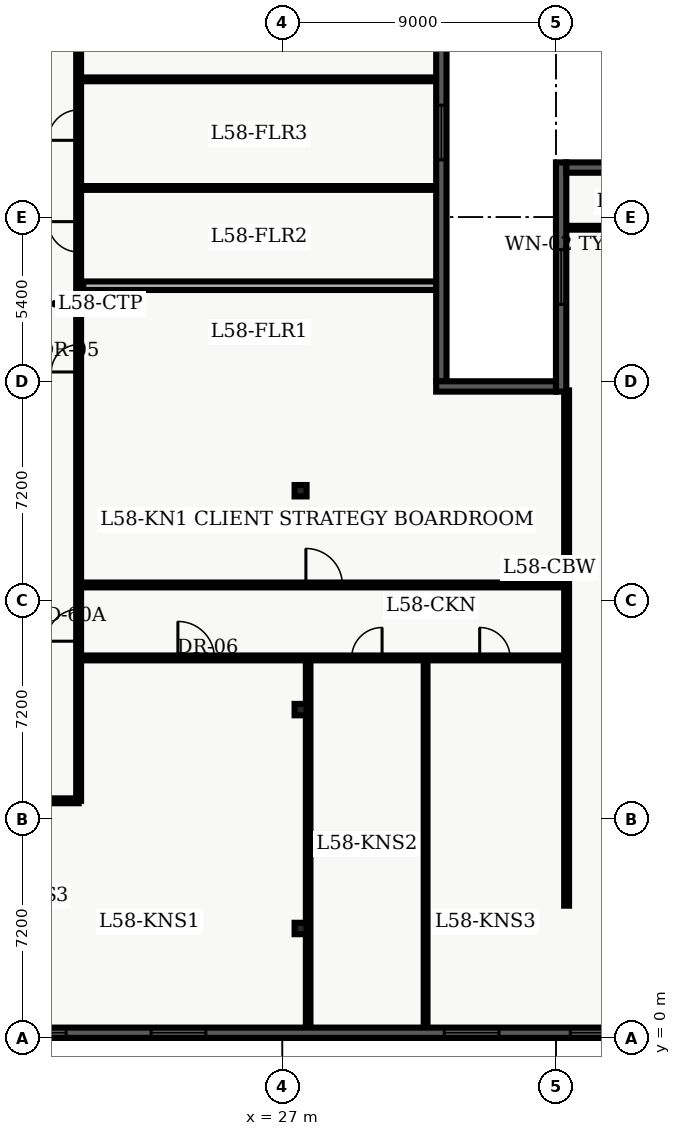
"""IFC4 building model, lengths in metres.
Left out: names, types, materials, properties, quantities, classifications, styles, units other than length and angle.
Written with IfcOpenShell. Run it as: python <this file> out.ifc"""

import sys

from ifc_helpers import new_model, entity, si_unit, converted_unit, direction, frame, origin_with_axes, origin_2d_with_axis, place, context, subcontext, project, spatial, polyline, rectangle, i_section, outline, extrude, element, fill, save


model = new_model("IFC4")
c1 = context("Model", 3, precision=1e-05, world=origin_with_axes(), true_north=direction((0.0, 1.0)))
c2 = subcontext(c1, "Body", "Model", "MODEL_VIEW")
j1 = project(units=[si_unit("LENGTHUNIT", "METRE"), converted_unit("PLANEANGLEUNIT", "DEGREE", entity("IfcPlaneAngleMeasure", 0.017), si_unit("PLANEANGLEUNIT", "RADIAN"), dimensions=[0, 0, 0, 0, 0, 0, 0])], contexts=[c1])
p1 = place(None, origin_with_axes())
s1 = spatial("IfcSite", under=j1, at=p1, CompositionType="ELEMENT")
p2 = place(p1, origin_with_axes())
s2 = spatial("IfcBuilding", under=s1, at=p2, CompositionType="ELEMENT")
p3 = place(p2, frame((0.0, 0.0, 236.4), z_axis=(0.0, 0.0, 1.0), x_axis=(1.0, 0.0, 0.0)))
s3 = spatial("IfcBuildingStorey", under=s2, at=p3, CompositionType="ELEMENT", Elevation=236.4)
for number, where, z_axis, x_axis in (
    (1, (27.6, 3.6, 0.0), (0.0, 0.0, 1.0), (1.0, 0.0, 0.0)),
    (2, (27.6, 10.8, 0.0), (0.0, 0.0, 1.0), (1.0, 0.0, 0.0)),
    (3, (27.6, 18.0, 0.0), (0.0, 0.0, 1.0), (1.0, 0.0, 0.0)),
):
    element("IfcColumn", number, at=place(p3, frame(where, z_axis=z_axis, x_axis=x_axis)), inside=s3, PredefinedType="COLUMN", context=c2, shape_type="SweptSolid", body=[
        extrude(i_section(OverallWidth=0.394, OverallDepth=0.375, WebThickness=0.017, FlangeThickness=0.028, FilletRadius=0.02, at=origin_2d_with_axis()), origin_with_axes(), (0.0, 0.0, 1.0), 3.9),
    ])
p4 = place(p3, frame((7.1, 7.8, 0.0), z_axis=(0.0, 0.0, 1.0), x_axis=(1.0, 0.0, 0.0)))
e4 = element("IfcWall", 4, at=p4, inside=s3, PredefinedType="PARTITIONING", context=c2, shape_type="SweptSolid", body=[
    extrude(outline(polyline([(0.0, -0.08), (13.2, -0.08), (13.2, 0.08), (0.0, 0.08), (0.0, -0.08)])), origin_with_axes(), (0.0, 0.0, 1.0), 2.7),
])
p5 = place(p4, frame((2.929, 0.0, 0.0), z_axis=(0.0, 0.0, 1.0), x_axis=(1.0, 0.0, 0.0)))
e5 = element("IfcOpeningElement", 5, at=p5, cuts=e4, PredefinedType="OPENING", context=c2, shape_type="SweptSolid", body=[
    extrude(rectangle(XDim=1.0, YDim=0.18, at=origin_2d_with_axis()), origin_with_axes(), (0.0, 0.0, 1.0), 2.15),
])
p6 = place(p4, frame((7.56, 0.0, 0.0), z_axis=(0.0, 0.0, 1.0), x_axis=(1.0, 0.0, 0.0)))
e6 = element("IfcOpeningElement", 6, at=p6, cuts=e4, PredefinedType="OPENING", context=c2, shape_type="SweptSolid", body=[
    extrude(rectangle(XDim=1.0, YDim=0.18, at=origin_2d_with_axis()), origin_with_axes(), (0.0, 0.0, 1.0), 2.15),
])
p7 = place(p4, frame((11.201, 0.0, 0.0), z_axis=(0.0, 0.0, 1.0), x_axis=(1.0, 0.0, 0.0)))
e7 = element("IfcOpeningElement", 7, at=p7, cuts=e4, PredefinedType="OPENING", context=c2, shape_type="SweptSolid", body=[
    extrude(rectangle(XDim=1.0, YDim=0.18, at=origin_2d_with_axis()), origin_with_axes(), (0.0, 0.0, 1.0), 2.15),
])
p8 = place(p3, frame((20.3, 7.8, 0.0), z_axis=(0.0, 0.0, 1.0), x_axis=(0.0, 1.0, 0.0)))
e8 = element("IfcWall", 8, at=p8, inside=s3, PredefinedType="PARTITIONING", context=c2, shape_type="SweptSolid", body=[
    extrude(outline(polyline([(0.0, -0.08), (32.7, -0.08), (32.7, 0.08), (0.0, 0.08), (0.0, -0.08)])), origin_with_axes(), (0.0, 0.0, 1.0), 2.7),
])
p9 = place(p8, frame((14.556, 0.0, 0.0), z_axis=(0.0, 0.0, 1.0), x_axis=(1.0, 0.0, 0.0)))
e9 = element("IfcOpeningElement", 9, at=p9, cuts=e8, PredefinedType="OPENING", context=c2, shape_type="SweptSolid", body=[
    extrude(rectangle(XDim=0.9, YDim=0.18, at=origin_2d_with_axis()), origin_with_axes(), (0.0, 0.0, 1.0), 2.15),
])
p10 = place(p8, frame((18.551, 0.0, 0.0), z_axis=(0.0, 0.0, 1.0), x_axis=(1.0, 0.0, 0.0)))
e10 = element("IfcOpeningElement", 10, at=p10, cuts=e8, PredefinedType="OPENING", context=c2, shape_type="SweptSolid", body=[
    extrude(rectangle(XDim=1.0, YDim=0.18, at=origin_2d_with_axis()), origin_with_axes(), (0.0, 0.0, 1.0), 2.15),
])
p11 = place(p8, frame((22.226, 0.0, 0.0), z_axis=(0.0, 0.0, 1.0), x_axis=(1.0, 0.0, 0.0)))
e11 = element("IfcOpeningElement", 11, at=p11, cuts=e8, PredefinedType="OPENING", context=c2, shape_type="SweptSolid", body=[
    extrude(rectangle(XDim=1.0, YDim=0.18, at=origin_2d_with_axis()), origin_with_axes(), (0.0, 0.0, 1.0), 2.15),
])
p12 = place(p8, frame((25.754, 0.0, 0.0), z_axis=(0.0, 0.0, 1.0), x_axis=(1.0, 0.0, 0.0)))
e12 = element("IfcOpeningElement", 12, at=p12, cuts=e8, PredefinedType="OPENING", context=c2, shape_type="SweptSolid", body=[
    extrude(rectangle(XDim=1.0, YDim=0.18, at=origin_2d_with_axis()), origin_with_axes(), (0.0, 0.0, 1.0), 2.15),
])
p13 = place(p8, frame((5.775, 0.0, 0.0), z_axis=(0.0, 0.0, 1.0), x_axis=(1.0, 0.0, 0.0)))
e13 = element("IfcOpeningElement", 13, at=p13, cuts=e8, PredefinedType="OPENING", context=c2, shape_type="SweptSolid", body=[
    extrude(rectangle(XDim=1.05, YDim=0.18, at=origin_2d_with_axis()), origin_with_axes(), (0.0, 0.0, 1.0), 2.15),
])
p14 = place(p3, frame((20.45, 24.743, 0.0), z_axis=(0.0, 0.0, 1.0), x_axis=(1.0, 0.0, 0.0)))
e14 = element("IfcWall", 14, at=p14, inside=s3, PredefinedType="PARTITIONING", context=c2, shape_type="SweptSolid", body=[
    extrude(outline(polyline([(0.0, -0.14), (11.615, -0.14), (11.615, 0.14), (0.0, 0.14), (0.0, -0.14)])), origin_with_axes(), (0.0, 0.0, 1.0), 2.7),
])
for number, where, z_axis, x_axis in (
    (15, (20.45, 27.959, 0.0), (0.0, 0.0, 1.0), (1.0, 0.0, 0.0)),
    (16, (20.45, 31.532, 0.0), (0.0, 0.0, 1.0), (1.0, 0.0, 0.0)),
):
    element("IfcWall", number, at=place(p3, frame(where, z_axis=z_axis, x_axis=x_axis)), inside=s3, PredefinedType="PARTITIONING", context=c2, shape_type="SweptSolid", body=[
        extrude(outline(polyline([(0.0, -0.062), (11.615, -0.062), (11.615, 0.062), (0.0, 0.062), (0.0, -0.062)])), origin_with_axes(), (0.0, 0.0, 1.0), 2.7),
    ])
p15 = place(p3, frame((20.3, 12.5, 0.0), z_axis=(0.0, 0.0, 1.0), x_axis=(1.0, 0.0, 0.0)))
e17 = element("IfcWall", 17, at=p15, inside=s3, PredefinedType="PARTITIONING", context=c2, shape_type="SweptSolid", body=[
    extrude(outline(polyline([(0.0, -0.08), (16.05, -0.08), (16.05, 0.08), (0.0, 0.08), (0.0, -0.08)])), origin_with_axes(), (0.0, 0.0, 1.0), 2.7),
])
p16 = place(p15, frame((3.865, 0.0, 0.0), z_axis=(0.0, 0.0, 1.0), x_axis=(1.0, 0.0, 0.0)))
e18 = element("IfcOpeningElement", 18, at=p16, cuts=e17, PredefinedType="OPENING", context=c2, shape_type="SweptSolid", body=[
    extrude(rectangle(XDim=1.2, YDim=0.18, at=origin_2d_with_axis()), origin_with_axes(), (0.0, 0.0, 1.0), 2.2),
])
p17 = place(p15, frame((9.48, 0.0, 0.0), z_axis=(0.0, 0.0, 1.0), x_axis=(1.0, 0.0, 0.0)))
e19 = element("IfcOpeningElement", 19, at=p17, cuts=e17, PredefinedType="OPENING", context=c2, shape_type="SweptSolid", body=[
    extrude(rectangle(XDim=1.0, YDim=0.18, at=origin_2d_with_axis()), origin_with_axes(), (0.0, 0.0, 1.0), 2.15),
])
p18 = place(p15, frame((13.691, 0.0, 0.0), z_axis=(0.0, 0.0, 1.0), x_axis=(1.0, 0.0, 0.0)))
e20 = element("IfcOpeningElement", 20, at=p18, cuts=e17, PredefinedType="OPENING", context=c2, shape_type="SweptSolid", body=[
    extrude(rectangle(XDim=1.0, YDim=0.18, at=origin_2d_with_axis()), origin_with_axes(), (0.0, 0.0, 1.0), 2.15),
])
p19 = place(p3, frame((20.3, 14.9, 0.0), z_axis=(0.0, 0.0, 1.0), x_axis=(1.0, 0.0, 0.0)))
e21 = element("IfcWall", 21, at=p19, inside=s3, PredefinedType="PARTITIONING", context=c2, shape_type="SweptSolid", body=[
    extrude(outline(polyline([(0.0, -0.08), (16.05, -0.08), (16.05, 0.08), (0.0, 0.08), (0.0, -0.08)])), origin_with_axes(), (0.0, 0.0, 1.0), 2.7),
])
p20 = place(p19, frame((8.075, 0.0, 0.0), z_axis=(0.0, 0.0, 1.0), x_axis=(1.0, 0.0, 0.0)))
e22 = element("IfcOpeningElement", 22, at=p20, cuts=e21, PredefinedType="OPENING", context=c2, shape_type="SweptSolid", body=[
    extrude(rectangle(XDim=1.2, YDim=0.18, at=origin_2d_with_axis()), origin_with_axes(), (0.0, 0.0, 1.0), 2.2),
])
p21 = place(p3, frame((36.35, 4.35, 0.0), z_axis=(0.0, 0.0, 1.0), x_axis=(0.0, 1.0, 0.0)))
e23 = element("IfcWall", 23, at=p21, inside=s3, PredefinedType="PARTITIONING", context=c2, shape_type="SweptSolid", body=[
    extrude(outline(polyline([(0.0, -0.08), (16.95, -0.08), (16.95, 0.08), (0.0, 0.08), (0.0, -0.08)])), origin_with_axes(), (0.0, 0.0, 1.0), 2.7),
])
p22 = place(p3, frame((27.849, 0.335, 0.0), z_axis=(0.0, 0.0, 1.0), x_axis=(0.0, 1.0, 0.0)))
e24 = element("IfcWall", 24, at=p22, inside=s3, PredefinedType="PARTITIONING", context=c2, shape_type="SweptSolid", body=[
    extrude(outline(polyline([(0.0, -0.075), (12.045, -0.075), (12.045, 0.075), (0.0, 0.075), (0.0, -0.075)])), origin_with_axes(), (0.0, 0.0, 1.0), 2.7),
])
p23 = place(p3, frame((31.712, 0.335, 0.0), z_axis=(0.0, 0.0, 1.0), x_axis=(0.0, 1.0, 0.0)))
e25 = element("IfcWall", 25, at=p23, inside=s3, PredefinedType="PARTITIONING", context=c2, shape_type="SweptSolid", body=[
    extrude(outline(polyline([(0.0, -0.062), (12.045, -0.062), (12.045, 0.062), (0.0, 0.062), (0.0, -0.062)])), origin_with_axes(), (0.0, 0.0, 1.0), 2.7),
])
p24 = place(p3, frame((36.335, 26.65, 0.0), z_axis=(0.0, 0.0, 1.0), x_axis=(1.0, 0.0, 0.0)))
e26 = element("IfcWall", 26, at=p24, inside=s3, PredefinedType="PARTITIONING", context=c2, shape_type="SweptSolid", body=[
    extrude(outline(polyline([(0.0, -0.062), (11.195, -0.062), (11.195, 0.062), (0.0, 0.062), (0.0, -0.062)])), origin_with_axes(), (0.0, 0.0, 1.0), 2.7),
])
p25 = place(p24, frame((6.665, 0.0, 0.0), z_axis=(0.0, 0.0, 1.0), x_axis=(1.0, 0.0, 0.0)))
e27 = element("IfcOpeningElement", 27, at=p25, cuts=e26, PredefinedType="OPENING", context=c2, shape_type="SweptSolid", body=[
    extrude(rectangle(XDim=1.0, YDim=0.145, at=origin_2d_with_axis()), origin_with_axes(), (0.0, 0.0, 1.0), 2.15),
])
p26 = place(p3, frame((36.17, 21.26, 0.0), z_axis=(0.0, 0.0, 1.0), x_axis=(0.0, 1.0, 0.0)))
e28 = element("IfcWall", 28, at=p26, inside=s3, PredefinedType="SOLIDWALL", context=c2, shape_type="SweptSolid", body=[
    extrude(outline(polyline([(0.0, -0.17), (7.54, -0.17), (7.54, 0.17), (0.0, 0.17), (0.0, -0.17)])), origin_with_axes(), (0.0, 0.0, 1.0), 3.66),
])
p27 = place(p26, frame((3.77, 0.0, 0.45), z_axis=(0.0, 0.0, 1.0), x_axis=(1.0, 0.0, 0.0)))
e29 = element("IfcOpeningElement", 29, at=p27, cuts=e28, PredefinedType="OPENING", context=c2, shape_type="SweptSolid", body=[
    extrude(rectangle(XDim=1.8, YDim=0.36, at=origin_2d_with_axis()), origin_with_axes(), (0.0, 0.0, 1.0), 2.1),
])
p28 = place(p3, frame((36.34, 28.63, 0.0), z_axis=(0.0, 0.0, 1.0), x_axis=(1.0, 0.0, 0.0)))
e30 = element("IfcWall", 30, at=p28, inside=s3, PredefinedType="SOLIDWALL", context=c2, shape_type="SweptSolid", body=[
    extrude(outline(polyline([(0.0, -0.17), (13.46, -0.17), (13.46, 0.17), (0.0, 0.17), (0.0, -0.17)])), origin_with_axes(), (0.0, 0.0, 1.0), 3.66),
])
p29 = place(p28, frame((3.665, 0.0, 0.45), z_axis=(0.0, 0.0, 1.0), x_axis=(1.0, 0.0, 0.0)))
e31 = element("IfcOpeningElement", 31, at=p29, cuts=e30, PredefinedType="OPENING", context=c2, shape_type="SweptSolid", body=[
    extrude(rectangle(XDim=1.8, YDim=0.36, at=origin_2d_with_axis()), origin_with_axes(), (0.0, 0.0, 1.0), 2.1),
])
p30 = place(p28, frame((9.795, 0.0, 0.45), z_axis=(0.0, 0.0, 1.0), x_axis=(1.0, 0.0, 0.0)))
e32 = element("IfcOpeningElement", 32, at=p30, cuts=e30, PredefinedType="OPENING", context=c2, shape_type="SweptSolid", body=[
    extrude(rectangle(XDim=1.8, YDim=0.36, at=origin_2d_with_axis()), origin_with_axes(), (0.0, 0.0, 1.0), 2.1),
])
p31 = place(p3, frame((49.46, 0.17, 0.0), z_axis=(0.0, 0.0, 1.0), x_axis=(-1.0, 0.0, 0.0)))
e33 = element("IfcWall", 33, at=p31, inside=s3, PredefinedType="SOLIDWALL", context=c2, shape_type="SweptSolid", body=[
    extrude(outline(polyline([(0.0, -0.17), (42.56, -0.17), (42.56, 0.17), (0.0, 0.17), (0.0, -0.17)])), origin_with_axes(), (0.0, 0.0, 1.0), 3.66),
])
p32 = place(p31, frame((2.898, 0.0, 0.45), z_axis=(0.0, 0.0, 1.0), x_axis=(1.0, 0.0, 0.0)))
e34 = element("IfcOpeningElement", 34, at=p32, cuts=e33, PredefinedType="OPENING", context=c2, shape_type="SweptSolid", body=[
    extrude(rectangle(XDim=1.8, YDim=0.36, at=origin_2d_with_axis()), origin_with_axes(), (0.0, 0.0, 1.0), 2.1),
])
p33 = place(p31, frame((7.493, 0.0, 0.45), z_axis=(0.0, 0.0, 1.0), x_axis=(1.0, 0.0, 0.0)))
e35 = element("IfcOpeningElement", 35, at=p33, cuts=e33, PredefinedType="OPENING", context=c2, shape_type="SweptSolid", body=[
    extrude(rectangle(XDim=1.8, YDim=0.36, at=origin_2d_with_axis()), origin_with_axes(), (0.0, 0.0, 1.0), 2.1),
])
p34 = place(p31, frame((12.089, 0.0, 0.45), z_axis=(0.0, 0.0, 1.0), x_axis=(1.0, 0.0, 0.0)))
e36 = element("IfcOpeningElement", 36, at=p34, cuts=e33, PredefinedType="OPENING", context=c2, shape_type="SweptSolid", body=[
    extrude(rectangle(XDim=1.8, YDim=0.36, at=origin_2d_with_axis()), origin_with_axes(), (0.0, 0.0, 1.0), 2.1),
])
p35 = place(p31, frame((16.234, 0.0, 0.45), z_axis=(0.0, 0.0, 1.0), x_axis=(1.0, 0.0, 0.0)))
e37 = element("IfcOpeningElement", 37, at=p35, cuts=e33, PredefinedType="OPENING", context=c2, shape_type="SweptSolid", body=[
    extrude(rectangle(XDim=1.8, YDim=0.36, at=origin_2d_with_axis()), origin_with_axes(), (0.0, 0.0, 1.0), 2.1),
])
p36 = place(p31, frame((25.876, 0.0, 0.45), z_axis=(0.0, 0.0, 1.0), x_axis=(1.0, 0.0, 0.0)))
e38 = element("IfcOpeningElement", 38, at=p36, cuts=e33, PredefinedType="OPENING", context=c2, shape_type="SweptSolid", body=[
    extrude(rectangle(XDim=1.8, YDim=0.36, at=origin_2d_with_axis()), origin_with_axes(), (0.0, 0.0, 1.0), 2.1),
])
p37 = place(p31, frame((30.471, 0.0, 0.45), z_axis=(0.0, 0.0, 1.0), x_axis=(1.0, 0.0, 0.0)))
e39 = element("IfcOpeningElement", 39, at=p37, cuts=e33, PredefinedType="OPENING", context=c2, shape_type="SweptSolid", body=[
    extrude(rectangle(XDim=1.8, YDim=0.36, at=origin_2d_with_axis()), origin_with_axes(), (0.0, 0.0, 1.0), 2.1),
])
p38 = place(p31, frame((35.067, 0.0, 0.45), z_axis=(0.0, 0.0, 1.0), x_axis=(1.0, 0.0, 0.0)))
e40 = element("IfcOpeningElement", 40, at=p38, cuts=e33, PredefinedType="OPENING", context=c2, shape_type="SweptSolid", body=[
    extrude(rectangle(XDim=1.8, YDim=0.36, at=origin_2d_with_axis()), origin_with_axes(), (0.0, 0.0, 1.0), 2.1),
])
p39 = place(p31, frame((39.662, 0.0, 0.45), z_axis=(0.0, 0.0, 1.0), x_axis=(1.0, 0.0, 0.0)))
e41 = element("IfcOpeningElement", 41, at=p39, cuts=e33, PredefinedType="OPENING", context=c2, shape_type="SweptSolid", body=[
    extrude(rectangle(XDim=1.8, YDim=0.36, at=origin_2d_with_axis()), origin_with_axes(), (0.0, 0.0, 1.0), 2.1),
])
p40 = place(p3, frame((32.23, 41.82, 0.0), z_axis=(0.0, 0.0, 1.0), x_axis=(0.0, -1.0, 0.0)))
e42 = element("IfcWall", 42, at=p40, inside=s3, PredefinedType="SOLIDWALL", context=c2, shape_type="SweptSolid", body=[
    extrude(outline(polyline([(0.0, -0.17), (20.22, -0.17), (20.22, 0.17), (0.0, 0.17), (0.0, -0.17)])), origin_with_axes(), (0.0, 0.0, 1.0), 3.66),
])
p41 = place(p40, frame((2.978, 0.0, 0.45), z_axis=(0.0, 0.0, 1.0), x_axis=(1.0, 0.0, 0.0)))
e43 = element("IfcOpeningElement", 43, at=p41, cuts=e42, PredefinedType="OPENING", context=c2, shape_type="SweptSolid", body=[
    extrude(rectangle(XDim=1.8, YDim=0.36, at=origin_2d_with_axis()), origin_with_axes(), (0.0, 0.0, 1.0), 2.1),
])
p42 = place(p40, frame((7.732, 0.0, 0.45), z_axis=(0.0, 0.0, 1.0), x_axis=(1.0, 0.0, 0.0)))
e44 = element("IfcOpeningElement", 44, at=p42, cuts=e42, PredefinedType="OPENING", context=c2, shape_type="SweptSolid", body=[
    extrude(rectangle(XDim=1.8, YDim=0.36, at=origin_2d_with_axis()), origin_with_axes(), (0.0, 0.0, 1.0), 2.1),
])
p43 = place(p40, frame((12.037, 0.0, 0.45), z_axis=(0.0, 0.0, 1.0), x_axis=(1.0, 0.0, 0.0)))
e45 = element("IfcOpeningElement", 45, at=p43, cuts=e42, PredefinedType="OPENING", context=c2, shape_type="SweptSolid", body=[
    extrude(rectangle(XDim=1.8, YDim=0.36, at=origin_2d_with_axis()), origin_with_axes(), (0.0, 0.0, 1.0), 2.1),
])
p44 = place(p3, frame((32.06, 21.43, 0.0), z_axis=(0.0, 0.0, 1.0), x_axis=(1.0, 0.0, 0.0)))
e46 = element("IfcWall", 46, at=p44, inside=s3, PredefinedType="SOLIDWALL", context=c2, shape_type="SweptSolid", body=[
    extrude(outline(polyline([(0.0, -0.17), (3.94, -0.17), (3.94, 0.17), (0.0, 0.17), (0.0, -0.17)])), origin_with_axes(), (0.0, 0.0, 1.0), 3.66),
])
p45 = place(p8, frame((14.556, 0.0, 0.0), z_axis=(0.0, 0.0, 1.0), x_axis=(1.0, 0.0, 0.0)))
e47 = element("IfcDoor", 47, at=p45, inside=s3, OperationType="SINGLE_SWING_LEFT", PredefinedType="DOOR", context=c2, shape_type="SweptSolid", body=[
    extrude(rectangle(XDim=0.9, YDim=0.09, at=origin_2d_with_axis()), origin_with_axes(), (0.0, 0.0, 1.0), 2.15),
])
fill(e9, e47)
p46 = place(p8, frame((18.551, 0.0, 0.0), z_axis=(0.0, 0.0, 1.0), x_axis=(1.0, 0.0, 0.0)))
e48 = element("IfcDoor", 48, at=p46, inside=s3, OperationType="SINGLE_SWING_RIGHT", PredefinedType="DOOR", context=c2, shape_type="SweptSolid", body=[
    extrude(rectangle(XDim=1.0, YDim=0.09, at=origin_2d_with_axis()), origin_with_axes(), (0.0, 0.0, 1.0), 2.15),
])
fill(e10, e48)
p47 = place(p8, frame((22.226, 0.0, 0.0), z_axis=(0.0, 0.0, 1.0), x_axis=(1.0, 0.0, 0.0)))
e49 = element("IfcDoor", 49, at=p47, inside=s3, OperationType="SINGLE_SWING_LEFT", PredefinedType="DOOR", context=c2, shape_type="SweptSolid", body=[
    extrude(rectangle(XDim=1.0, YDim=0.09, at=origin_2d_with_axis()), origin_with_axes(), (0.0, 0.0, 1.0), 2.15),
])
fill(e11, e49)
p48 = place(p8, frame((5.775, 0.0, 0.0), z_axis=(0.0, 0.0, 1.0), x_axis=(1.0, 0.0, 0.0)))
e50 = element("IfcDoor", 50, at=p48, inside=s3, OperationType="SINGLE_SWING_LEFT", PredefinedType="DOOR", context=c2, shape_type="SweptSolid", body=[
    extrude(rectangle(XDim=1.05, YDim=0.09, at=origin_2d_with_axis()), origin_with_axes(), (0.0, 0.0, 1.0), 2.15),
])
fill(e13, e50)
p49 = place(p15, frame((3.865, 0.0, 0.0), z_axis=(0.0, 0.0, 1.0), x_axis=(1.0, 0.0, 0.0)))
e51 = element("IfcDoor", 51, at=p49, inside=s3, OperationType="SINGLE_SWING_LEFT", PredefinedType="DOOR", context=c2, shape_type="SweptSolid", body=[
    extrude(rectangle(XDim=1.2, YDim=0.09, at=origin_2d_with_axis()), origin_with_axes(), (0.0, 0.0, 1.0), 2.2),
])
fill(e18, e51)
p50 = place(p15, frame((9.48, 0.0, 0.0), z_axis=(0.0, 0.0, 1.0), x_axis=(1.0, 0.0, 0.0)))
e52 = element("IfcDoor", 52, at=p50, inside=s3, OperationType="SINGLE_SWING_RIGHT", PredefinedType="DOOR", context=c2, shape_type="SweptSolid", body=[
    extrude(rectangle(XDim=1.0, YDim=0.09, at=origin_2d_with_axis()), origin_with_axes(), (0.0, 0.0, 1.0), 2.15),
])
fill(e19, e52)
p51 = place(p15, frame((13.691, 0.0, 0.0), z_axis=(0.0, 0.0, 1.0), x_axis=(1.0, 0.0, 0.0)))
e53 = element("IfcDoor", 53, at=p51, inside=s3, OperationType="SINGLE_SWING_LEFT", PredefinedType="DOOR", context=c2, shape_type="SweptSolid", body=[
    extrude(rectangle(XDim=1.0, YDim=0.09, at=origin_2d_with_axis()), origin_with_axes(), (0.0, 0.0, 1.0), 2.15),
])
fill(e20, e53)
p52 = place(p19, frame((8.075, 0.0, 0.0), z_axis=(0.0, 0.0, 1.0), x_axis=(1.0, 0.0, 0.0)))
e54 = element("IfcDoor", 54, at=p52, inside=s3, OperationType="SINGLE_SWING_LEFT", PredefinedType="DOOR", context=c2, shape_type="SweptSolid", body=[
    extrude(rectangle(XDim=1.2, YDim=0.09, at=origin_2d_with_axis()), origin_with_axes(), (0.0, 0.0, 1.0), 2.2),
])
fill(e22, e54)
p53 = place(p26, frame((3.77, 0.0, 0.45), z_axis=(0.0, 0.0, 1.0), x_axis=(1.0, 0.0, 0.0)))
e55 = element("IfcWindow", 55, at=p53, inside=s3, PredefinedType="WINDOW", context=c2, shape_type="SweptSolid", body=[
    extrude(rectangle(XDim=1.8, YDim=0.09, at=origin_2d_with_axis()), origin_with_axes(), (0.0, 0.0, 1.0), 2.1),
])
fill(e29, e55)
p54 = place(p31, frame((12.089, 0.0, 0.45), z_axis=(0.0, 0.0, 1.0), x_axis=(1.0, 0.0, 0.0)))
e56 = element("IfcWindow", 56, at=p54, inside=s3, PredefinedType="WINDOW", context=c2, shape_type="SweptSolid", body=[
    extrude(rectangle(XDim=1.8, YDim=0.09, at=origin_2d_with_axis()), origin_with_axes(), (0.0, 0.0, 1.0), 2.1),
])
fill(e36, e56)
p55 = place(p31, frame((16.234, 0.0, 0.45), z_axis=(0.0, 0.0, 1.0), x_axis=(1.0, 0.0, 0.0)))
e57 = element("IfcWindow", 57, at=p55, inside=s3, PredefinedType="WINDOW", context=c2, shape_type="SweptSolid", body=[
    extrude(rectangle(XDim=1.8, YDim=0.09, at=origin_2d_with_axis()), origin_with_axes(), (0.0, 0.0, 1.0), 2.1),
])
fill(e37, e57)
p56 = place(p31, frame((25.876, 0.0, 0.45), z_axis=(0.0, 0.0, 1.0), x_axis=(1.0, 0.0, 0.0)))
e58 = element("IfcWindow", 58, at=p56, inside=s3, PredefinedType="WINDOW", context=c2, shape_type="SweptSolid", body=[
    extrude(rectangle(XDim=1.8, YDim=0.09, at=origin_2d_with_axis()), origin_with_axes(), (0.0, 0.0, 1.0), 2.1),
])
fill(e38, e58)
p57 = place(p31, frame((30.471, 0.0, 0.45), z_axis=(0.0, 0.0, 1.0), x_axis=(1.0, 0.0, 0.0)))
e59 = element("IfcWindow", 59, at=p57, inside=s3, PredefinedType="WINDOW", context=c2, shape_type="SweptSolid", body=[
    extrude(rectangle(XDim=1.8, YDim=0.09, at=origin_2d_with_axis()), origin_with_axes(), (0.0, 0.0, 1.0), 2.1),
])
fill(e39, e59)
p58 = place(p40, frame((12.037, 0.0, 0.45), z_axis=(0.0, 0.0, 1.0), x_axis=(1.0, 0.0, 0.0)))
e60 = element("IfcWindow", 60, at=p58, inside=s3, PredefinedType="WINDOW", context=c2, shape_type="SweptSolid", body=[
    extrude(rectangle(XDim=1.8, YDim=0.09, at=origin_2d_with_axis()), origin_with_axes(), (0.0, 0.0, 1.0), 2.1),
])
fill(e45, e60)
save(model, sys.argv[1])
